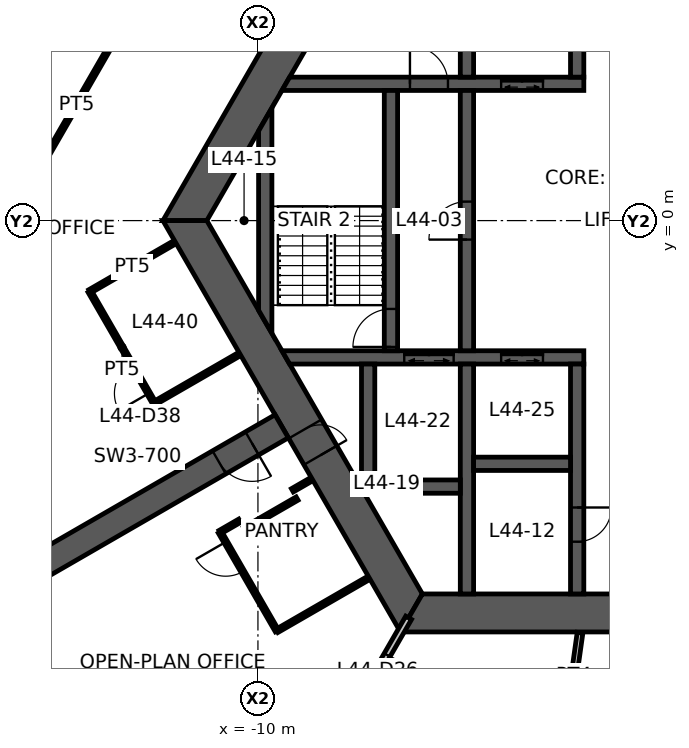
"""IFC4 building model, lengths in metres.
Left out: names, types, materials, properties, quantities, classifications, styles, units other than length and angle.
Written with IfcOpenShell. Run it as: python <this file> out.ifc"""

import sys

from ifc_helpers import new_model, si_unit, direction, frame, frame_2d, origin, place, context, subcontext, project, spatial, polyline, rectangle, outline, extrude, element, fill, save


model = new_model("IFC4")
c1 = context("Model", 3, precision=1e-05, world=origin(), true_north=direction((0.0, 1.0)))
c2 = subcontext(c1, "Body", "Model", "MODEL_VIEW")
j1 = project(units=[si_unit("LENGTHUNIT", "METRE"), si_unit("PLANEANGLEUNIT", "RADIAN")], contexts=[c1])
p1 = place(None, origin())
s1 = spatial("IfcSite", under=j1, at=p1, CompositionType="ELEMENT")
p2 = place(p1, origin())
s2 = spatial("IfcBuilding", under=s1, at=p2, CompositionType="ELEMENT")
p3 = place(p2, frame((0.0, 0.0, 176.0)))
s3 = spatial("IfcBuildingStorey", under=s2, at=p3, CompositionType="ELEMENT", Elevation=176.0)
p4 = place(p3, frame((-5.961, 10.325, 0.0), z_axis=(0.0, 0.0, 1.0), x_axis=(-0.500004296715, -0.866022923061, 0.0)))
e1 = element("IfcWall", 1, at=p4, inside=s3, PredefinedType="SHEAR", context=c2, shape_type="SweptSolid", body=[
    extrude(outline(polyline([(-0.289, -0.5), (4.494, -0.5), (5.494, -0.5), (12.211, -0.5), (11.634, 0.5), (5.494, 0.5), (4.494, 0.5), (0.289, 0.5), (-0.289, -0.5)])), origin(), (0.0, 0.0, 1.0), 3.9),
])
p5 = place(p4, frame((4.494, 0.0, 0.0)))
e2 = element("IfcOpeningElement", 2, at=p5, cuts=e1, PredefinedType="OPENING", context=c2, shape_type="SweptSolid", body=[
    extrude(rectangle(XDim=1.0, YDim=2.1, at=frame_2d((0.5, 1.05))), frame((0.0, 0.51, 0.0), z_axis=(0.0, -1.0, 0.0), x_axis=(1.0, 0.0, 0.0)), (0.0, 0.0, 1.0), 1.02),
])
p6 = place(p3, frame((-11.922, 0.0, 0.0), z_axis=(0.0, 0.0, 1.0), x_axis=(0.500004296715, -0.866022923061, 0.0)))
e3 = element("IfcWall", 3, at=p6, inside=s3, PredefinedType="SHEAR", context=c2, shape_type="SweptSolid", body=[
    extrude(outline(polyline([(-0.289, -0.5), (6.331, -0.5), (7.131, -0.5), (12.211, -0.5), (11.634, 0.5), (7.131, 0.5), (6.331, 0.5), (0.289, 0.5), (-0.289, -0.5)])), origin(), (0.0, 0.0, 1.0), 3.9),
])
p7 = place(p6, frame((6.331, 0.0, 0.0)))
e4 = element("IfcOpeningElement", 4, at=p7, cuts=e3, PredefinedType="OPENING", context=c2, shape_type="SweptSolid", body=[
    extrude(rectangle(XDim=0.8, YDim=2.1, at=frame_2d((0.4, 1.05))), frame((0.0, 0.51, 0.0), z_axis=(0.0, -1.0, 0.0), x_axis=(1.0, 0.0, 0.0)), (0.0, 0.0, 1.0), 1.02),
])
p8 = place(p3, frame((-5.961, -10.325, 0.0), z_axis=(0.0, 0.0, 1.0), x_axis=(1.0, 0.0, 0.0)))
e5 = element("IfcWall", 5, at=p8, inside=s3, PredefinedType="SHEAR", context=c2, shape_type="SweptSolid", body=[
    extrude(outline(polyline([(-0.289, -0.5), (5.461, -0.5), (6.461, -0.5), (12.211, -0.5), (11.634, 0.5), (6.461, 0.5), (5.461, 0.5), (0.289, 0.5), (-0.289, -0.5)])), origin(), (0.0, 0.0, 1.0), 3.9),
])
p9 = place(p8, frame((5.461, 0.0, 0.0)))
e6 = element("IfcOpeningElement", 6, at=p9, cuts=e5, PredefinedType="OPENING", context=c2, shape_type="SweptSolid", body=[
    extrude(rectangle(XDim=1.0, YDim=2.1, at=frame_2d((0.5, 1.05))), frame((0.0, 0.51, 0.0), z_axis=(0.0, -1.0, 0.0), x_axis=(1.0, 0.0, 0.0)), (0.0, 0.0, 1.0), 1.02),
])
p10 = place(p3, frame((-9.375, -5.413, 0.0), z_axis=(0.0, 0.0, 1.0), x_axis=(-0.866032377459, -0.499987921047, 0.0)))
e7 = element("IfcWall", 7, at=p10, inside=s3, PredefinedType="SHEAR", context=c2, shape_type="SweptSolid", body=[
    extrude(rectangle(XDim=7.696, YDim=0.7, at=frame_2d((3.848, 0.0))), origin(), (0.0, 0.0, 1.0), 3.9),
])
p11 = place(p10, frame((0.9, 0.0, 0.0)))
e8 = element("IfcOpeningElement", 8, at=p11, cuts=e7, PredefinedType="OPENING", context=c2, shape_type="SweptSolid", body=[
    extrude(rectangle(XDim=1.0, YDim=2.1, at=frame_2d((0.5, 1.05))), frame((0.0, 0.36, 0.0), z_axis=(0.0, -1.0, 0.0), x_axis=(1.0, 0.0, 0.0)), (0.0, 0.0, 1.0), 0.72),
])
p12 = place(p3, frame((-9.266, 3.6, 0.0), z_axis=(0.0, 0.0, 1.0), x_axis=(1.0, 0.0, 0.0)))
e9 = element("IfcWall", 9, at=p12, inside=s3, PredefinedType="SHEAR", context=c2, shape_type="SweptSolid", body=[
    extrude(outline(polyline([(-0.101, -0.175), (3.266, -0.175), (4.266, -0.175), (5.667, -0.175), (6.767, -0.175), (7.841, -0.175), (7.841, 0.175), (6.767, 0.175), (5.667, 0.175), (4.266, 0.175), (3.266, 0.175), (0.101, 0.175), (-0.101, -0.175)])), origin(), (0.0, 0.0, 1.0), 3.9),
])
p13 = place(p12, frame((3.266, 0.0, 0.0)))
e10 = element("IfcOpeningElement", 10, at=p13, cuts=e9, PredefinedType="OPENING", context=c2, shape_type="SweptSolid", body=[
    extrude(rectangle(XDim=1.0, YDim=2.1, at=frame_2d((0.5, 1.05))), frame((0.0, 0.185, 0.0), z_axis=(0.0, -1.0, 0.0), x_axis=(1.0, 0.0, 0.0)), (0.0, 0.0, 1.0), 0.37),
])
p14 = place(p12, frame((5.667, 0.0, 0.0)))
e11 = element("IfcOpeningElement", 11, at=p14, cuts=e9, PredefinedType="OPENING", context=c2, shape_type="SweptSolid", body=[
    extrude(rectangle(XDim=1.1, YDim=2.1, at=frame_2d((0.55, 1.05))), frame((0.0, 0.185, 0.0), z_axis=(0.0, -1.0, 0.0), x_axis=(1.0, 0.0, 0.0)), (0.0, 0.0, 1.0), 0.37),
])
p15 = place(p3, frame((-9.266, -3.6, 0.0), z_axis=(0.0, 0.0, 1.0), x_axis=(1.0, 0.0, 0.0)))
e12 = element("IfcWall", 12, at=p15, inside=s3, PredefinedType="SHEAR", context=c2, shape_type="SweptSolid", body=[
    extrude(outline(polyline([(0.101, -0.175), (3.116, -0.175), (4.417, -0.175), (5.667, -0.175), (6.767, -0.175), (7.841, -0.175), (7.841, 0.175), (6.767, 0.175), (5.667, 0.175), (4.417, 0.175), (3.116, 0.175), (-0.101, 0.175), (0.101, -0.175)])), origin(), (0.0, 0.0, 1.0), 3.9),
])
p16 = place(p15, frame((5.667, 0.0, 0.0)))
e13 = element("IfcOpeningElement", 13, at=p16, cuts=e12, PredefinedType="OPENING", context=c2, shape_type="SweptSolid", body=[
    extrude(rectangle(XDim=1.1, YDim=2.1, at=frame_2d((0.55, 1.05))), frame((0.0, 0.185, 0.0), z_axis=(0.0, -1.0, 0.0), x_axis=(1.0, 0.0, 0.0)), (0.0, 0.0, 1.0), 0.37),
])
p17 = place(p15, frame((3.116, 0.0, 0.0)))
e14 = element("IfcOpeningElement", 14, at=p17, cuts=e12, PredefinedType="OPENING", context=c2, shape_type="SweptSolid", body=[
    extrude(rectangle(XDim=1.3, YDim=2.1, at=frame_2d((0.65, 1.05))), frame((0.0, 0.185, 0.0), z_axis=(0.0, -1.0, 0.0), x_axis=(1.0, 0.0, 0.0)), (0.0, 0.0, 1.0), 0.37),
])
p18 = place(p3, frame((-1.6, 3.775, 0.0), z_axis=(0.0, 0.0, 1.0), x_axis=(0.0, 1.0, 0.0)))
e15 = element("IfcWall", 15, at=p18, inside=s3, PredefinedType="SHEAR", context=c2, shape_type="SweptSolid", body=[
    extrude(rectangle(XDim=6.05, YDim=0.35, at=frame_2d((3.025, 0.0))), origin(), (0.0, 0.0, 1.0), 3.9),
])
p19 = place(p18, frame((3.775, 0.0, 0.0)))
e16 = element("IfcOpeningElement", 16, at=p19, cuts=e15, PredefinedType="OPENING", context=c2, shape_type="SweptSolid", body=[
    extrude(rectangle(XDim=0.9, YDim=2.1, at=frame_2d((0.45, 1.05))), frame((0.0, 0.185, 0.0), z_axis=(0.0, -1.0, 0.0), x_axis=(1.0, 0.0, 0.0)), (0.0, 0.0, 1.0), 0.37),
])
p20 = place(p3, frame((-1.6, -3.775, 0.0), z_axis=(0.0, 0.0, 1.0), x_axis=(0.0, -1.0, 0.0)))
e17 = element("IfcWall", 17, at=p20, inside=s3, PredefinedType="SHEAR", context=c2, shape_type="SweptSolid", body=[
    extrude(rectangle(XDim=6.05, YDim=0.35, at=frame_2d((3.025, 0.0))), origin(), (0.0, 0.0, 1.0), 3.9),
])
p21 = place(p20, frame((3.775, 0.0, 0.0)))
e18 = element("IfcOpeningElement", 18, at=p21, cuts=e17, PredefinedType="OPENING", context=c2, shape_type="SweptSolid", body=[
    extrude(rectangle(XDim=0.9, YDim=2.1, at=frame_2d((0.45, 1.05))), frame((0.0, 0.185, 0.0), z_axis=(0.0, -1.0, 0.0), x_axis=(1.0, 0.0, 0.0)), (0.0, 0.0, 1.0), 0.37),
])
p22 = place(p3, frame((-4.5, -3.425, 0.0), z_axis=(0.0, 0.0, 1.0), x_axis=(0.0, 1.0, 0.0)))
e19 = element("IfcWall", 19, at=p22, inside=s3, PredefinedType="SHEAR", context=c2, shape_type="SweptSolid", body=[
    extrude(rectangle(XDim=6.85, YDim=0.35, at=frame_2d((3.425, 0.0))), origin(), (0.0, 0.0, 1.0), 3.9),
])
p23 = place(p22, frame((2.925, 0.0, 0.0)))
e20 = element("IfcOpeningElement", 20, at=p23, cuts=e19, PredefinedType="OPENING", context=c2, shape_type="SweptSolid", body=[
    extrude(rectangle(XDim=1.0, YDim=2.1, at=frame_2d((0.5, 1.05))), frame((0.0, 0.185, 0.0), z_axis=(0.0, -1.0, 0.0), x_axis=(1.0, 0.0, 0.0)), (0.0, 0.0, 1.0), 0.37),
])
p24 = place(p3, frame((-6.5, -3.425, 0.0), z_axis=(0.0, 0.0, 1.0), x_axis=(0.0, 1.0, 0.0)))
e21 = element("IfcWall", 21, at=p24, inside=s3, PredefinedType="SHEAR", context=c2, shape_type="SweptSolid", body=[
    extrude(rectangle(XDim=6.85, YDim=0.35, at=frame_2d((3.425, 0.0))), origin(), (0.0, 0.0, 1.0), 3.9),
])
p25 = place(p24, frame((0.1, 0.0, 0.0)))
e22 = element("IfcOpeningElement", 22, at=p25, cuts=e21, PredefinedType="OPENING", context=c2, shape_type="SweptSolid", body=[
    extrude(rectangle(XDim=1.0, YDim=2.1, at=frame_2d((0.5, 1.05))), frame((0.0, 0.185, 0.0), z_axis=(0.0, -1.0, 0.0), x_axis=(1.0, 0.0, 0.0)), (0.0, 0.0, 1.0), 0.37),
])
for number, where, z_axis, x_axis in (
    (23, (-4.5, 3.775, 0.0), (0.0, 0.0, 1.0), (0.0, 1.0, 0.0)),
    (24, (-4.5, -3.775, 0.0), (0.0, 0.0, 1.0), (0.0, -1.0, 0.0)),
):
    element("IfcWall", number, at=place(p3, frame(where, z_axis=z_axis, x_axis=x_axis)), inside=s3, PredefinedType="SHEAR", context=c2, shape_type="SweptSolid", body=[
        extrude(rectangle(XDim=6.05, YDim=0.35, at=frame_2d((3.025, 0.0))), origin(), (0.0, 0.0, 1.0), 3.9),
    ])
p26 = place(p3, frame((-4.325, -6.4, 0.0), z_axis=(0.0, 0.0, 1.0), x_axis=(1.0, 0.0, 0.0)))
e25 = element("IfcWall", 25, at=p26, inside=s3, PredefinedType="SHEAR", context=c2, shape_type="SweptSolid", body=[
    extrude(rectangle(XDim=2.55, YDim=0.35, at=frame_2d((1.275, 0.0))), origin(), (0.0, 0.0, 1.0), 3.9),
])
p27 = place(p3, frame((-6.925, -7.0, 0.0), z_axis=(0.0, 0.0, 1.0), x_axis=(1.0, 0.0, 0.0)))
e26 = element("IfcWall", 26, at=p27, inside=s3, PredefinedType="SHEAR", context=c2, shape_type="SweptSolid", body=[
    extrude(rectangle(XDim=2.25, YDim=0.35, at=frame_2d((1.125, 0.0))), origin(), (0.0, 0.0, 1.0), 3.9),
])
p28 = place(p3, frame((-7.1, -3.775, 0.0), z_axis=(0.0, 0.0, 1.0), x_axis=(0.0, -1.0, 0.0)))
e27 = element("IfcWall", 27, at=p28, inside=s3, PredefinedType="SHEAR", context=c2, shape_type="SweptSolid", body=[
    extrude(outline(polyline([(0.0, -0.175), (3.274, -0.175), (3.4, 0.0), (3.4, 0.175), (0.0, 0.175), (0.0, -0.175)])), origin(), (0.0, 0.0, 1.0), 3.9),
])
p29 = place(p3, frame((-9.808, -2.662, 0.0), z_axis=(0.0, 0.0, 1.0), x_axis=(0.0, 1.0, 0.0)))
e28 = element("IfcWall", 28, at=p29, inside=s3, PredefinedType="SHEAR", context=c2, shape_type="SweptSolid", body=[
    extrude(outline(polyline([(-0.303, -0.175), (5.628, -0.175), (5.021, 0.175), (0.303, 0.175), (-0.303, -0.175)])), origin(), (0.0, 0.0, 1.0), 3.9),
])
p30 = place(p3, frame((-6.035, -10.453, 0.0), z_axis=(0.0, 0.0, 1.0), x_axis=(-0.499989830942, -0.866031274813, 0.0)))
e29 = element("IfcWall", 29, at=p30, inside=s3, PredefinedType="PARTITIONING", context=c2, shape_type="SweptSolid", body=[
    extrude(rectangle(XDim=7.93, YDim=0.175, at=frame_2d((3.965, 0.0))), origin(), (0.0, 0.0, 1.0), 3.05),
])
p31 = place(p30, frame((1.13, 0.0, 0.0)))
e30 = element("IfcOpeningElement", 30, at=p31, cuts=e29, PredefinedType="OPENING", context=c2, shape_type="SweptSolid", body=[
    extrude(rectangle(XDim=1.0, YDim=2.1, at=frame_2d((0.5, 1.05))), frame((0.0, 0.098, 0.0), z_axis=(0.0, -1.0, 0.0), x_axis=(1.0, 0.0, 0.0)), (0.0, 0.0, 1.0), 0.195),
])
p32 = place(p3, frame((-13.941, 4.495, 0.0), z_axis=(0.0, 0.0, 1.0), x_axis=(-0.500033344505, -0.86600615147, 0.0)))
e31 = element("IfcWall", 31, at=p32, inside=s3, PredefinedType="PARTITIONING", context=c2, shape_type="SweptSolid", body=[
    extrude(rectangle(XDim=3.331, YDim=0.1, at=frame_2d((1.666, 0.0))), origin(), (0.0, 0.0, 1.0), 2.95),
])
p33 = place(p3, frame((-14.427, -1.863, 0.0), z_axis=(0.0, 0.0, 1.0), x_axis=(0.866045356598, 0.49996543912, 0.0)))
e32 = element("IfcWall", 32, at=p33, inside=s3, PredefinedType="PARTITIONING", context=c2, shape_type="SweptSolid", body=[
    extrude(rectangle(XDim=2.58, YDim=0.1, at=frame_2d((1.29, 0.0))), origin(), (0.0, 0.0, 1.0), 2.95),
])
p34 = place(p3, frame((-12.726, -4.807, 0.0), z_axis=(0.0, 0.0, 1.0), x_axis=(-0.500062241894, 0.865989465428, 0.0)))
e33 = element("IfcWall", 33, at=p34, inside=s3, PredefinedType="PARTITIONING", context=c2, shape_type="SweptSolid", body=[
    extrude(rectangle(XDim=3.4, YDim=0.1, at=frame_2d((1.7, 0.0))), origin(), (0.0, 0.0, 1.0), 2.95),
])
p35 = place(p34, frame((0.3, 0.0, 0.0)))
e34 = element("IfcOpeningElement", 34, at=p35, cuts=e33, PredefinedType="OPENING", context=c2, shape_type="SweptSolid", body=[
    extrude(rectangle(XDim=0.9, YDim=2.1, at=frame_2d((0.45, 1.05))), frame((0.0, 0.06, 0.0), z_axis=(0.0, -1.0, 0.0), x_axis=(1.0, 0.0, 0.0)), (0.0, 0.0, 1.0), 0.12),
])
p36 = place(p3, frame((-10.492, -3.517, 0.0), z_axis=(0.0, 0.0, 1.0), x_axis=(-0.866021702275, -0.500006411147, 0.0)))
e35 = element("IfcWall", 35, at=p36, inside=s3, PredefinedType="PARTITIONING", context=c2, shape_type="SweptSolid", body=[
    extrude(rectangle(XDim=2.58, YDim=0.1, at=frame_2d((1.29, 0.0))), origin(), (0.0, 0.0, 1.0), 2.95),
])
p37 = place(p3, frame((-11.0, -8.198, 0.0), z_axis=(0.0, 0.0, 1.0), x_axis=(0.866131372301, 0.499816412211, 0.0)))
e36 = element("IfcWall", 36, at=p37, inside=s3, PredefinedType="PARTITIONING", context=c2, shape_type="SweptSolid", body=[
    extrude(rectangle(XDim=0.6, YDim=0.1, at=frame_2d((0.3, 0.0))), origin(), (0.0, 0.0, 1.0), 2.95),
])
p38 = place(p3, frame((-10.355, -8.115, 0.0), z_axis=(0.0, 0.0, 1.0), x_axis=(0.866094119867, 0.499880961361, 0.0)))
e37 = element("IfcWall", 37, at=p38, inside=s3, PredefinedType="PARTITIONING", context=c2, shape_type="SweptSolid", body=[
    extrude(rectangle(XDim=1.6, YDim=0.1, at=frame_2d((0.8, 0.0))), origin(), (0.0, 0.0, 1.0), 2.95),
])
p39 = place(p3, frame((-9.5, -10.796, 0.0), z_axis=(0.0, 0.0, 1.0), x_axis=(-0.499990139034, 0.866031096941, 0.0)))
e38 = element("IfcWall", 38, at=p39, inside=s3, PredefinedType="PARTITIONING", context=c2, shape_type="SweptSolid", body=[
    extrude(rectangle(XDim=3.0, YDim=0.1, at=frame_2d((1.5, 0.0))), origin(), (0.0, 0.0, 1.0), 2.95),
])
p40 = place(p39, frame((1.8, 0.0, 0.0)))
e39 = element("IfcOpeningElement", 39, at=p40, cuts=e38, PredefinedType="OPENING", context=c2, shape_type="SweptSolid", body=[
    extrude(rectangle(XDim=0.9, YDim=2.1, at=frame_2d((0.45, 1.05))), frame((0.0, 0.06, 0.0), z_axis=(0.0, -1.0, 0.0), x_axis=(1.0, 0.0, 0.0)), (0.0, 0.0, 1.0), 0.12),
])
p41 = place(p3, frame((-9.094, -7.098, 0.0), z_axis=(0.0, 0.0, 1.0), x_axis=(0.865954211699, 0.50012328804, 0.0)))
e40 = element("IfcWall", 40, at=p41, inside=s3, PredefinedType="PARTITIONING", context=c2, shape_type="SweptSolid", body=[
    extrude(rectangle(XDim=0.58, YDim=0.1, at=frame_2d((0.29, 0.0))), origin(), (0.0, 0.0, 1.0), 2.95),
])
p42 = place(p3, frame((-7.092, -9.406, 0.0), z_axis=(0.0, 0.0, 1.0), x_axis=(-0.86603494908, -0.499983466698, 0.0)))
e41 = element("IfcWall", 41, at=p42, inside=s3, PredefinedType="PARTITIONING", context=c2, shape_type="SweptSolid", body=[
    extrude(rectangle(XDim=2.78, YDim=0.1, at=frame_2d((1.39, 0.0))), origin(), (0.0, 0.0, 1.0), 2.95),
])
p43 = place(p3, frame((-1.844, -13.125, 0.0), z_axis=(0.0, 0.0, 1.0), x_axis=(0.139119980631, 0.990275532864, 0.0)))
e42 = element("IfcWall", 42, at=p43, inside=s3, PredefinedType="PARTITIONING", context=c2, shape_type="SweptSolid", body=[
    extrude(rectangle(XDim=2.302, YDim=0.15, at=frame_2d((1.151, 0.0))), origin(), (0.0, 0.0, 1.0), 2.95),
])
p44 = place(p7, origin())
e43 = element("IfcDoor", 43, at=p44, inside=s3, OperationType="SINGLE_SWING_RIGHT", PredefinedType="DOOR", context=c2, shape_type="SweptSolid", body=[
    extrude(rectangle(XDim=0.8, YDim=2.1, at=frame_2d((0.4, 1.05))), frame((0.0, 0.025, 0.0), z_axis=(0.0, -1.0, 0.0), x_axis=(1.0, 0.0, 0.0)), (0.0, 0.0, 1.0), 0.05),
])
fill(e4, e43)
p45 = place(p23, origin())
e44 = element("IfcDoor", 44, at=p45, inside=s3, OperationType="SINGLE_SWING_LEFT", PredefinedType="DOOR", context=c2, shape_type="SweptSolid", body=[
    extrude(rectangle(XDim=1.0, YDim=2.1, at=frame_2d((0.5, 1.05))), frame((0.0, 0.025, 0.0), z_axis=(0.0, -1.0, 0.0), x_axis=(1.0, 0.0, 0.0)), (0.0, 0.0, 1.0), 0.05),
])
fill(e20, e44)
p46 = place(p25, origin())
e45 = element("IfcDoor", 45, at=p46, inside=s3, OperationType="SINGLE_SWING_LEFT", PredefinedType="DOOR", context=c2, shape_type="SweptSolid", body=[
    extrude(rectangle(XDim=1.0, YDim=2.1, at=frame_2d((0.5, 1.05))), frame((0.0, 0.025, 0.0), z_axis=(0.0, -1.0, 0.0), x_axis=(1.0, 0.0, 0.0)), (0.0, 0.0, 1.0), 0.05),
])
fill(e22, e45)
p47 = place(p13, origin())
e46 = element("IfcDoor", 46, at=p47, inside=s3, OperationType="SINGLE_SWING_LEFT", PredefinedType="DOOR", context=c2, shape_type="SweptSolid", body=[
    extrude(rectangle(XDim=1.0, YDim=2.1, at=frame_2d((0.5, 1.05))), frame((0.0, 0.025, 0.0), z_axis=(0.0, -1.0, 0.0), x_axis=(1.0, 0.0, 0.0)), (0.0, 0.0, 1.0), 0.05),
])
fill(e10, e46)
p48 = place(p21, origin())
e47 = element("IfcDoor", 47, at=p48, inside=s3, OperationType="SINGLE_SWING_LEFT", PredefinedType="DOOR", context=c2, shape_type="SweptSolid", body=[
    extrude(rectangle(XDim=0.9, YDim=2.1, at=frame_2d((0.45, 1.05))), frame((0.0, 0.025, 0.0), z_axis=(0.0, -1.0, 0.0), x_axis=(1.0, 0.0, 0.0)), (0.0, 0.0, 1.0), 0.05),
])
fill(e18, e47)
p49 = place(p11, origin())
e48 = element("IfcDoor", 48, at=p49, inside=s3, OperationType="SINGLE_SWING_LEFT", PredefinedType="DOOR", context=c2, shape_type="SweptSolid", body=[
    extrude(rectangle(XDim=1.0, YDim=2.1, at=frame_2d((0.5, 1.05))), frame((0.0, 0.025, 0.0), z_axis=(0.0, -1.0, 0.0), x_axis=(1.0, 0.0, 0.0)), (0.0, 0.0, 1.0), 0.05),
])
fill(e8, e48)
p50 = place(p31, origin())
e49 = element("IfcDoor", 49, at=p50, inside=s3, OperationType="SINGLE_SWING_LEFT", PredefinedType="DOOR", context=c2, shape_type="SweptSolid", body=[
    extrude(rectangle(XDim=1.0, YDim=2.1, at=frame_2d((0.5, 1.05))), frame((0.0, 0.025, 0.0), z_axis=(0.0, -1.0, 0.0), x_axis=(1.0, 0.0, 0.0)), (0.0, 0.0, 1.0), 0.05),
])
fill(e30, e49)
p51 = place(p35, origin())
e50 = element("IfcDoor", 50, at=p51, inside=s3, OperationType="SINGLE_SWING_LEFT", PredefinedType="DOOR", context=c2, shape_type="SweptSolid", body=[
    extrude(rectangle(XDim=0.9, YDim=2.1, at=frame_2d((0.45, 1.05))), frame((0.0, 0.025, 0.0), z_axis=(0.0, -1.0, 0.0), x_axis=(1.0, 0.0, 0.0)), (0.0, 0.0, 1.0), 0.05),
])
fill(e34, e50)
p52 = place(p40, origin())
e51 = element("IfcDoor", 51, at=p52, inside=s3, OperationType="SINGLE_SWING_RIGHT", PredefinedType="DOOR", context=c2, shape_type="SweptSolid", body=[
    extrude(rectangle(XDim=0.9, YDim=2.1, at=frame_2d((0.45, 1.05))), frame((0.0, 0.025, 0.0), z_axis=(0.0, -1.0, 0.0), x_axis=(1.0, 0.0, 0.0)), (0.0, 0.0, 1.0), 0.05),
])
fill(e39, e51)
p53 = place(p14, origin())
e52 = element("IfcDoor", 52, at=p53, inside=s3, OperationType="DOUBLE_DOOR_SLIDING", PredefinedType="DOOR", context=c2, shape_type="SweptSolid", body=[
    extrude(rectangle(XDim=1.1, YDim=2.1, at=frame_2d((0.55, 1.05))), frame((0.0, 0.025, 0.0), z_axis=(0.0, -1.0, 0.0), x_axis=(1.0, 0.0, 0.0)), (0.0, 0.0, 1.0), 0.05),
])
fill(e11, e52)
p54 = place(p16, origin())
e53 = element("IfcDoor", 53, at=p54, inside=s3, OperationType="DOUBLE_DOOR_SLIDING", PredefinedType="DOOR", context=c2, shape_type="SweptSolid", body=[
    extrude(rectangle(XDim=1.1, YDim=2.1, at=frame_2d((0.55, 1.05))), frame((0.0, 0.025, 0.0), z_axis=(0.0, -1.0, 0.0), x_axis=(1.0, 0.0, 0.0)), (0.0, 0.0, 1.0), 0.05),
])
fill(e13, e53)
p55 = place(p17, origin())
e54 = element("IfcDoor", 54, at=p55, inside=s3, OperationType="DOUBLE_DOOR_SLIDING", PredefinedType="DOOR", context=c2, shape_type="SweptSolid", body=[
    extrude(rectangle(XDim=1.3, YDim=2.1, at=frame_2d((0.65, 1.05))), frame((0.0, 0.025, 0.0), z_axis=(0.0, -1.0, 0.0), x_axis=(1.0, 0.0, 0.0)), (0.0, 0.0, 1.0), 0.05),
])
fill(e14, e54)
save(model, sys.argv[1])
